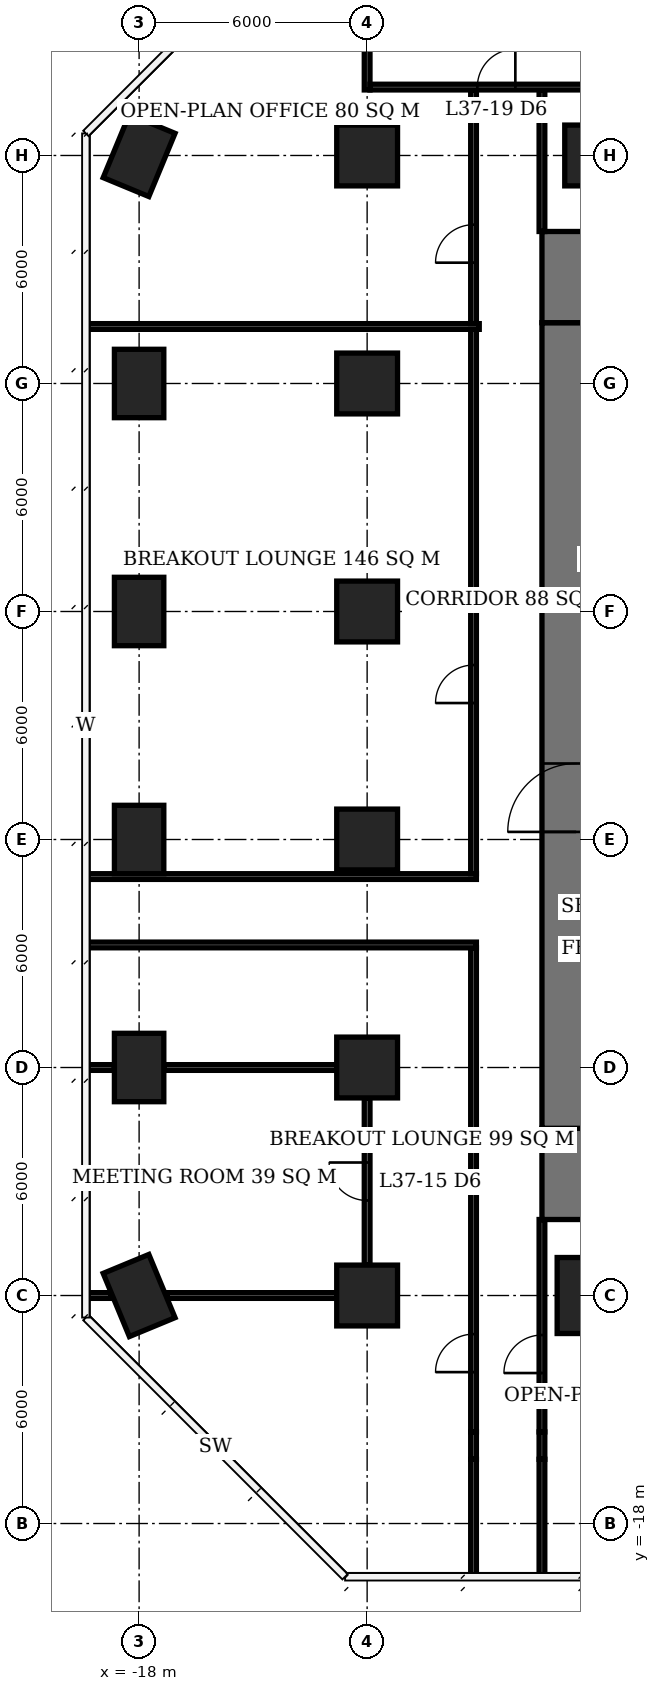
"""IFC4 building model, lengths in metres.
Left out: names, types, materials, properties, quantities, classifications, styles, units other than length and angle.
Written with IfcOpenShell. Run it as: python <this file> out.ifc"""

import sys

from ifc_helpers import new_model, si_unit, direction, frame, frame_2d, origin, origin_2d, place, context, subcontext, project, spatial, rectangle, extrude, element, fill, save


model = new_model("IFC4")
c1 = context("Model", 3, precision=1e-05, world=origin(), true_north=direction((0.0, 1.0)))
c2 = subcontext(c1, "Body", "Model", "MODEL_VIEW")
j1 = project(units=[si_unit("LENGTHUNIT", "METRE"), si_unit("PLANEANGLEUNIT", "RADIAN")], contexts=[c1])
p1 = place(None, origin())
s1 = spatial("IfcSite", under=j1, at=p1, CompositionType="ELEMENT")
p2 = place(p1, origin())
s2 = spatial("IfcBuilding", under=s1, at=p2, CompositionType="ELEMENT")
p3 = place(p2, frame((0.0, 0.0, 152.3)))
s3 = spatial("IfcBuildingStorey", under=s2, at=p3, CompositionType="ELEMENT", Elevation=152.3)
for number, where, z_axis, x_axis in (
    (1, (-18.0, -12.0, 0.0), (0.0, 0.0, 1.0), (-0.383, 0.924, 0.0)),
    (2, (-18.0, -6.0, 0.0), (0.0, 0.0, 1.0), (0.0, 1.0, 0.0)),
    (3, (-18.0, 0.0, 0.0), (0.0, 0.0, 1.0), (0.0, 1.0, 0.0)),
    (4, (-18.0, 6.0, 0.0), (0.0, 0.0, 1.0), (0.0, 1.0, 0.0)),
    (5, (-18.0, 12.0, 0.0), (0.0, 0.0, 1.0), (0.0, 1.0, 0.0)),
    (6, (-18.0, 18.0, 0.0), (0.0, 0.0, 1.0), (0.383, 0.924, 0.0)),
):
    element("IfcColumn", number, at=place(p3, frame(where, z_axis=z_axis, x_axis=x_axis)), inside=s3, PredefinedType="COLUMN", context=c2, shape_type="SweptSolid", body=[
        extrude(rectangle(XDim=1.8, YDim=1.3, at=origin_2d()), origin(), (0.0, 0.0, 1.0), 3.9),
    ])
for number, where, z_axis, x_axis in (
    (7, (-12.0, -12.0, 0.0), (0.0, 0.0, 1.0), (1.0, 0.0, 0.0)),
    (8, (-12.0, -6.0, 0.0), (0.0, 0.0, 1.0), (1.0, 0.0, 0.0)),
    (9, (-12.0, 0.0, 0.0), (0.0, 0.0, 1.0), (1.0, 0.0, 0.0)),
    (10, (-12.0, 6.0, 0.0), (0.0, 0.0, 1.0), (1.0, 0.0, 0.0)),
    (11, (-12.0, 12.0, 0.0), (0.0, 0.0, 1.0), (1.0, 0.0, 0.0)),
    (12, (-12.0, 18.0, 0.0), (0.0, 0.0, 1.0), (1.0, 0.0, 0.0)),
):
    element("IfcColumn", number, at=place(p3, frame(where, z_axis=z_axis, x_axis=x_axis)), inside=s3, PredefinedType="COLUMN", context=c2, shape_type="SweptSolid", body=[
        extrude(rectangle(XDim=1.6, YDim=1.6, at=origin_2d()), origin(), (0.0, 0.0, 1.0), 3.9),
    ])
p4 = place(p3, frame((-6.0, -12.0, 0.0), z_axis=(0.0, 0.0, 1.0), x_axis=(1.0, 0.0, 0.0)))
e13 = element("IfcColumn", 13, at=p4, inside=s3, PredefinedType="COLUMN", context=c2, shape_type="SweptSolid", body=[
    extrude(rectangle(XDim=2.0, YDim=2.0, at=origin_2d()), origin(), (0.0, 0.0, 1.0), 3.9),
])
p5 = place(p3, frame((-6.0, 18.0, 0.0), z_axis=(0.0, 0.0, 1.0), x_axis=(1.0, 0.0, 0.0)))
e14 = element("IfcColumn", 14, at=p5, inside=s3, PredefinedType="COLUMN", context=c2, shape_type="SweptSolid", body=[
    extrude(rectangle(XDim=1.6, YDim=1.6, at=origin_2d()), origin(), (0.0, 0.0, 1.0), 3.9),
])
p6 = place(p3, frame((-6.5, -7.6, 0.0), z_axis=(0.0, 0.0, 1.0), x_axis=(0.0, 1.0, 0.0)))
e15 = element("IfcWall", 15, at=p6, inside=s3, PredefinedType="SHEAR", context=c2, shape_type="SweptSolid", body=[
    extrude(rectangle(XDim=21.2, YDim=1.8, at=frame_2d((10.6, 0.0))), origin(), (0.0, 0.0, 1.0), 3.9),
])
p7 = place(p6, frame((7.8, 0.0, 0.0)))
e16 = element("IfcOpeningElement", 16, at=p7, cuts=e15, PredefinedType="OPENING", context=c2, shape_type="SweptSolid", body=[
    extrude(rectangle(XDim=1.8, YDim=2.4, at=frame_2d((0.9, 1.2))), frame((0.0, 0.91, 0.0), z_axis=(0.0, -1.0, 0.0), x_axis=(1.0, 0.0, 0.0)), (0.0, 0.0, 1.0), 1.82),
])
for number, where, z_axis, x_axis in (
    (17, (-6.5, -10.0, 0.0), (0.0, 0.0, 1.0), (0.0, 1.0, 0.0)),
    (18, (-6.5, 13.6, 0.0), (0.0, 0.0, 1.0), (0.0, 1.0, 0.0)),
):
    element("IfcWall", number, at=place(p3, frame(where, z_axis=z_axis, x_axis=x_axis)), inside=s3, PredefinedType="SHEAR", context=c2, shape_type="SweptSolid", body=[
        extrude(rectangle(XDim=2.4, YDim=1.8, at=frame_2d((1.2, 0.0))), origin(), (0.0, 0.0, 1.0), 3.9),
    ])
p8 = place(p3, frame((-19.4, -12.0, 0.0), z_axis=(0.0, 0.0, 1.0), x_axis=(1.0, 0.0, 0.0)))
e19 = element("IfcWall", 19, at=p8, inside=s3, PredefinedType="PARTITIONING", context=c2, shape_type="SweptSolid", body=[
    extrude(rectangle(XDim=0.665, YDim=0.15, at=frame_2d((0.333, 0.0))), origin(), (0.0, 0.0, 1.0), 3.65),
])
p9 = place(p3, frame((-17.265, -12.0, 0.0), z_axis=(0.0, 0.0, 1.0), x_axis=(1.0, 0.0, 0.0)))
e20 = element("IfcWall", 20, at=p9, inside=s3, PredefinedType="PARTITIONING", context=c2, shape_type="SweptSolid", body=[
    extrude(rectangle(XDim=4.465, YDim=0.15, at=frame_2d((2.233, 0.0))), origin(), (0.0, 0.0, 1.0), 3.65),
])
p10 = place(p3, frame((-19.4, -6.0, 0.0), z_axis=(0.0, 0.0, 1.0), x_axis=(1.0, 0.0, 0.0)))
e21 = element("IfcWall", 21, at=p10, inside=s3, PredefinedType="PARTITIONING", context=c2, shape_type="SweptSolid", body=[
    extrude(rectangle(XDim=0.75, YDim=0.15, at=frame_2d((0.375, 0.0))), origin(), (0.0, 0.0, 1.0), 3.65),
])
p11 = place(p3, frame((-17.35, -6.0, 0.0), z_axis=(0.0, 0.0, 1.0), x_axis=(1.0, 0.0, 0.0)))
e22 = element("IfcWall", 22, at=p11, inside=s3, PredefinedType="PARTITIONING", context=c2, shape_type="SweptSolid", body=[
    extrude(rectangle(XDim=4.55, YDim=0.15, at=frame_2d((2.275, 0.0))), origin(), (0.0, 0.0, 1.0), 3.65),
])
p12 = place(p3, frame((-11.925, 19.8, 0.0), z_axis=(0.0, 0.0, 1.0), x_axis=(1.0, 0.0, 0.0)))
e23 = element("IfcWall", 23, at=p12, inside=s3, PredefinedType="PARTITIONING", context=c2, shape_type="SweptSolid", body=[
    extrude(rectangle(XDim=5.85, YDim=0.15, at=frame_2d((2.925, 0.0))), origin(), (0.0, 0.0, 1.0), 3.65),
])
p13 = place(p12, frame((2.825, 0.0, 0.0)))
e24 = element("IfcOpeningElement", 24, at=p13, cuts=e23, PredefinedType="OPENING", context=c2, shape_type="SweptSolid", body=[
    extrude(rectangle(XDim=1.0, YDim=2.1, at=frame_2d((0.5, 1.05))), frame((0.0, 0.085, 0.0), z_axis=(0.0, -1.0, 0.0), x_axis=(1.0, 0.0, 0.0)), (0.0, 0.0, 1.0), 0.17),
])
p14 = place(p3, frame((-12.0, -11.2, 0.0), z_axis=(0.0, 0.0, 1.0), x_axis=(0.0, 1.0, 0.0)))
e25 = element("IfcWall", 25, at=p14, inside=s3, PredefinedType="PARTITIONING", context=c2, shape_type="SweptSolid", body=[
    extrude(rectangle(XDim=4.4, YDim=0.15, at=frame_2d((2.2, 0.0))), origin(), (0.0, 0.0, 1.0), 3.65),
])
p15 = place(p14, frame((1.7, 0.0, 0.0)))
e26 = element("IfcOpeningElement", 26, at=p15, cuts=e25, PredefinedType="OPENING", context=c2, shape_type="SweptSolid", body=[
    extrude(rectangle(XDim=1.0, YDim=2.1, at=frame_2d((0.5, 1.05))), frame((0.0, 0.085, 0.0), z_axis=(0.0, -1.0, 0.0), x_axis=(1.0, 0.0, 0.0)), (0.0, 0.0, 1.0), 0.17),
])
p16 = place(p3, frame((-12.0, 19.725, 0.0), z_axis=(0.0, 0.0, 1.0), x_axis=(0.0, 1.0, 0.0)))
e27 = element("IfcWall", 27, at=p16, inside=s3, PredefinedType="PARTITIONING", context=c2, shape_type="SweptSolid", body=[
    extrude(rectangle(XDim=3.54, YDim=0.15, at=frame_2d((1.77, 0.0))), origin(), (0.0, 0.0, 1.0), 3.65),
])
for number, where, z_axis, x_axis in (
    (28, (-19.4, -2.775, 0.0), (0.0, 0.0, 1.0), (1.0, 0.0, 0.0)),
    (29, (-19.4, -0.975, 0.0), (0.0, 0.0, 1.0), (1.0, 0.0, 0.0)),
):
    element("IfcWall", number, at=place(p3, frame(where, z_axis=z_axis, x_axis=x_axis)), inside=s3, PredefinedType="PARTITIONING", context=c2, shape_type="SweptSolid", body=[
        extrude(rectangle(XDim=10.275, YDim=0.15, at=frame_2d((5.137, 0.0))), origin(), (0.0, 0.0, 1.0), 3.65),
    ])
p17 = place(p3, frame((-19.4, 13.5, 0.0), z_axis=(0.0, 0.0, 1.0), x_axis=(1.0, 0.0, 0.0)))
e30 = element("IfcWall", 30, at=p17, inside=s3, PredefinedType="PARTITIONING", context=c2, shape_type="SweptSolid", body=[
    extrude(rectangle(XDim=10.35, YDim=0.15, at=frame_2d((5.175, 0.0))), origin(), (0.0, 0.0, 1.0), 3.65),
])
p18 = place(p3, frame((-9.2, -19.4, 0.0), z_axis=(0.0, 0.0, 1.0), x_axis=(0.0, 1.0, 0.0)))
e31 = element("IfcWall", 31, at=p18, inside=s3, PredefinedType="PARTITIONING", context=c2, shape_type="SweptSolid", body=[
    extrude(rectangle(XDim=3.09, YDim=0.15, at=frame_2d((1.545, 0.0))), origin(), (0.0, 0.0, 1.0), 3.65),
])
p19 = place(p3, frame((-9.2, -16.31, 0.0), z_axis=(0.0, 0.0, 1.0), x_axis=(0.0, 1.0, 0.0)))
e32 = element("IfcWall", 32, at=p19, inside=s3, PredefinedType="PARTITIONING", context=c2, shape_type="SweptSolid", body=[
    extrude(rectangle(XDim=0.72, YDim=0.15, at=frame_2d((0.36, 0.0))), origin(), (0.0, 0.0, 1.0), 2.65),
])
p20 = place(p3, frame((-9.2, -15.59, 0.0), z_axis=(0.0, 0.0, 1.0), x_axis=(0.0, 1.0, 0.0)))
e33 = element("IfcWall", 33, at=p20, inside=s3, PredefinedType="PARTITIONING", context=c2, shape_type="SweptSolid", body=[
    extrude(rectangle(XDim=12.74, YDim=0.15, at=frame_2d((6.37, 0.0))), origin(), (0.0, 0.0, 1.0), 3.65),
])
p21 = place(p20, frame((1.574, 0.0, 0.0)))
e34 = element("IfcOpeningElement", 34, at=p21, cuts=e33, PredefinedType="OPENING", context=c2, shape_type="SweptSolid", body=[
    extrude(rectangle(XDim=1.0, YDim=2.1, at=frame_2d((0.5, 1.05))), frame((0.0, 0.085, 0.0), z_axis=(0.0, -1.0, 0.0), x_axis=(1.0, 0.0, 0.0)), (0.0, 0.0, 1.0), 0.17),
])
p22 = place(p3, frame((-9.2, -0.9, 0.0), z_axis=(0.0, 0.0, 1.0), x_axis=(0.0, 1.0, 0.0)))
e35 = element("IfcWall", 35, at=p22, inside=s3, PredefinedType="PARTITIONING", context=c2, shape_type="SweptSolid", body=[
    extrude(rectangle(XDim=14.325, YDim=0.15, at=frame_2d((7.163, 0.0))), origin(), (0.0, 0.0, 1.0), 3.65),
])
p23 = place(p22, frame((4.491, 0.0, 0.0)))
e36 = element("IfcOpeningElement", 36, at=p23, cuts=e35, PredefinedType="OPENING", context=c2, shape_type="SweptSolid", body=[
    extrude(rectangle(XDim=1.0, YDim=2.1, at=frame_2d((0.5, 1.05))), frame((0.0, 0.085, 0.0), z_axis=(0.0, -1.0, 0.0), x_axis=(1.0, 0.0, 0.0)), (0.0, 0.0, 1.0), 0.17),
])
p24 = place(p3, frame((-9.2, 13.575, 0.0), z_axis=(0.0, 0.0, 1.0), x_axis=(0.0, 1.0, 0.0)))
e37 = element("IfcWall", 37, at=p24, inside=s3, PredefinedType="PARTITIONING", context=c2, shape_type="SweptSolid", body=[
    extrude(rectangle(XDim=6.15, YDim=0.15, at=frame_2d((3.075, 0.0))), origin(), (0.0, 0.0, 1.0), 3.65),
])
p25 = place(p24, frame((1.604, 0.0, 0.0)))
e38 = element("IfcOpeningElement", 38, at=p25, cuts=e37, PredefinedType="OPENING", context=c2, shape_type="SweptSolid", body=[
    extrude(rectangle(XDim=1.0, YDim=2.1, at=frame_2d((0.5, 1.05))), frame((0.0, 0.085, 0.0), z_axis=(0.0, -1.0, 0.0), x_axis=(1.0, 0.0, 0.0)), (0.0, 0.0, 1.0), 0.17),
])
p26 = place(p3, frame((-7.4, -19.4, 0.0), z_axis=(0.0, 0.0, 1.0), x_axis=(0.0, 1.0, 0.0)))
e39 = element("IfcWall", 39, at=p26, inside=s3, PredefinedType="PARTITIONING", context=c2, shape_type="SweptSolid", body=[
    extrude(rectangle(XDim=3.09, YDim=0.15, at=frame_2d((1.545, 0.0))), origin(), (0.0, 0.0, 1.0), 3.65),
])
p27 = place(p3, frame((-7.4, -16.31, 0.0), z_axis=(0.0, 0.0, 1.0), x_axis=(0.0, 1.0, 0.0)))
e40 = element("IfcWall", 40, at=p27, inside=s3, PredefinedType="PARTITIONING", context=c2, shape_type="SweptSolid", body=[
    extrude(rectangle(XDim=0.72, YDim=0.15, at=frame_2d((0.36, 0.0))), origin(), (0.0, 0.0, 1.0), 2.65),
])
p28 = place(p3, frame((-7.4, -15.59, 0.0), z_axis=(0.0, 0.0, 1.0), x_axis=(0.0, 1.0, 0.0)))
e41 = element("IfcWall", 41, at=p28, inside=s3, PredefinedType="PARTITIONING", context=c2, shape_type="SweptSolid", body=[
    extrude(rectangle(XDim=5.59, YDim=0.15, at=frame_2d((2.795, 0.0))), origin(), (0.0, 0.0, 1.0), 3.65),
])
p29 = place(p28, frame((1.55, 0.0, 0.0)))
e42 = element("IfcOpeningElement", 42, at=p29, cuts=e41, PredefinedType="OPENING", context=c2, shape_type="SweptSolid", body=[
    extrude(rectangle(XDim=1.0, YDim=2.1, at=frame_2d((0.5, 1.05))), frame((0.0, 0.085, 0.0), z_axis=(0.0, -1.0, 0.0), x_axis=(1.0, 0.0, 0.0)), (0.0, 0.0, 1.0), 0.17),
])
p30 = place(p3, frame((-7.4, 16.0, 0.0), z_axis=(0.0, 0.0, 1.0), x_axis=(0.0, 1.0, 0.0)))
e43 = element("IfcWall", 43, at=p30, inside=s3, PredefinedType="PARTITIONING", context=c2, shape_type="SweptSolid", body=[
    extrude(rectangle(XDim=3.725, YDim=0.15, at=frame_2d((1.863, 0.0))), origin(), (0.0, 0.0, 1.0), 3.65),
])
p31 = place(p7, origin())
e44 = element("IfcDoor", 44, at=p31, inside=s3, OperationType="DOUBLE_DOOR_SINGLE_SWING", PredefinedType="DOOR", context=c2, shape_type="SweptSolid", body=[
    extrude(rectangle(XDim=1.8, YDim=2.4, at=frame_2d((0.9, 1.2))), frame((0.0, 0.025, 0.0), z_axis=(0.0, -1.0, 0.0), x_axis=(1.0, 0.0, 0.0)), (0.0, 0.0, 1.0), 0.05),
])
fill(e16, e44)
p32 = place(p15, origin())
e45 = element("IfcDoor", 45, at=p32, inside=s3, OperationType="SINGLE_SWING_RIGHT", PredefinedType="DOOR", context=c2, shape_type="SweptSolid", body=[
    extrude(rectangle(XDim=1.0, YDim=2.1, at=frame_2d((0.5, 1.05))), frame((0.0, 0.025, 0.0), z_axis=(0.0, -1.0, 0.0), x_axis=(1.0, 0.0, 0.0)), (0.0, 0.0, 1.0), 0.05),
])
fill(e26, e45)
p33 = place(p13, origin())
e46 = element("IfcDoor", 46, at=p33, inside=s3, OperationType="SINGLE_SWING_RIGHT", PredefinedType="DOOR", context=c2, shape_type="SweptSolid", body=[
    extrude(rectangle(XDim=1.0, YDim=2.1, at=frame_2d((0.5, 1.05))), frame((0.0, 0.025, 0.0), z_axis=(0.0, -1.0, 0.0), x_axis=(1.0, 0.0, 0.0)), (0.0, 0.0, 1.0), 0.05),
])
fill(e24, e46)
p34 = place(p29, origin())
e47 = element("IfcDoor", 47, at=p34, inside=s3, OperationType="SINGLE_SWING_LEFT", PredefinedType="DOOR", context=c2, shape_type="SweptSolid", body=[
    extrude(rectangle(XDim=1.0, YDim=2.1, at=frame_2d((0.5, 1.05))), frame((0.0, 0.025, 0.0), z_axis=(0.0, -1.0, 0.0), x_axis=(1.0, 0.0, 0.0)), (0.0, 0.0, 1.0), 0.05),
])
fill(e42, e47)
p35 = place(p21, origin())
e48 = element("IfcDoor", 48, at=p35, inside=s3, OperationType="SINGLE_SWING_LEFT", PredefinedType="DOOR", context=c2, shape_type="SweptSolid", body=[
    extrude(rectangle(XDim=1.0, YDim=2.1, at=frame_2d((0.5, 1.05))), frame((0.0, 0.025, 0.0), z_axis=(0.0, -1.0, 0.0), x_axis=(1.0, 0.0, 0.0)), (0.0, 0.0, 1.0), 0.05),
])
fill(e34, e48)
p36 = place(p23, origin())
e49 = element("IfcDoor", 49, at=p36, inside=s3, OperationType="SINGLE_SWING_LEFT", PredefinedType="DOOR", context=c2, shape_type="SweptSolid", body=[
    extrude(rectangle(XDim=1.0, YDim=2.1, at=frame_2d((0.5, 1.05))), frame((0.0, 0.025, 0.0), z_axis=(0.0, -1.0, 0.0), x_axis=(1.0, 0.0, 0.0)), (0.0, 0.0, 1.0), 0.05),
])
fill(e36, e49)
p37 = place(p25, origin())
e50 = element("IfcDoor", 50, at=p37, inside=s3, OperationType="SINGLE_SWING_LEFT", PredefinedType="DOOR", context=c2, shape_type="SweptSolid", body=[
    extrude(rectangle(XDim=1.0, YDim=2.1, at=frame_2d((0.5, 1.05))), frame((0.0, 0.025, 0.0), z_axis=(0.0, -1.0, 0.0), x_axis=(1.0, 0.0, 0.0)), (0.0, 0.0, 1.0), 0.05),
])
fill(e38, e50)
save(model, sys.argv[1])
